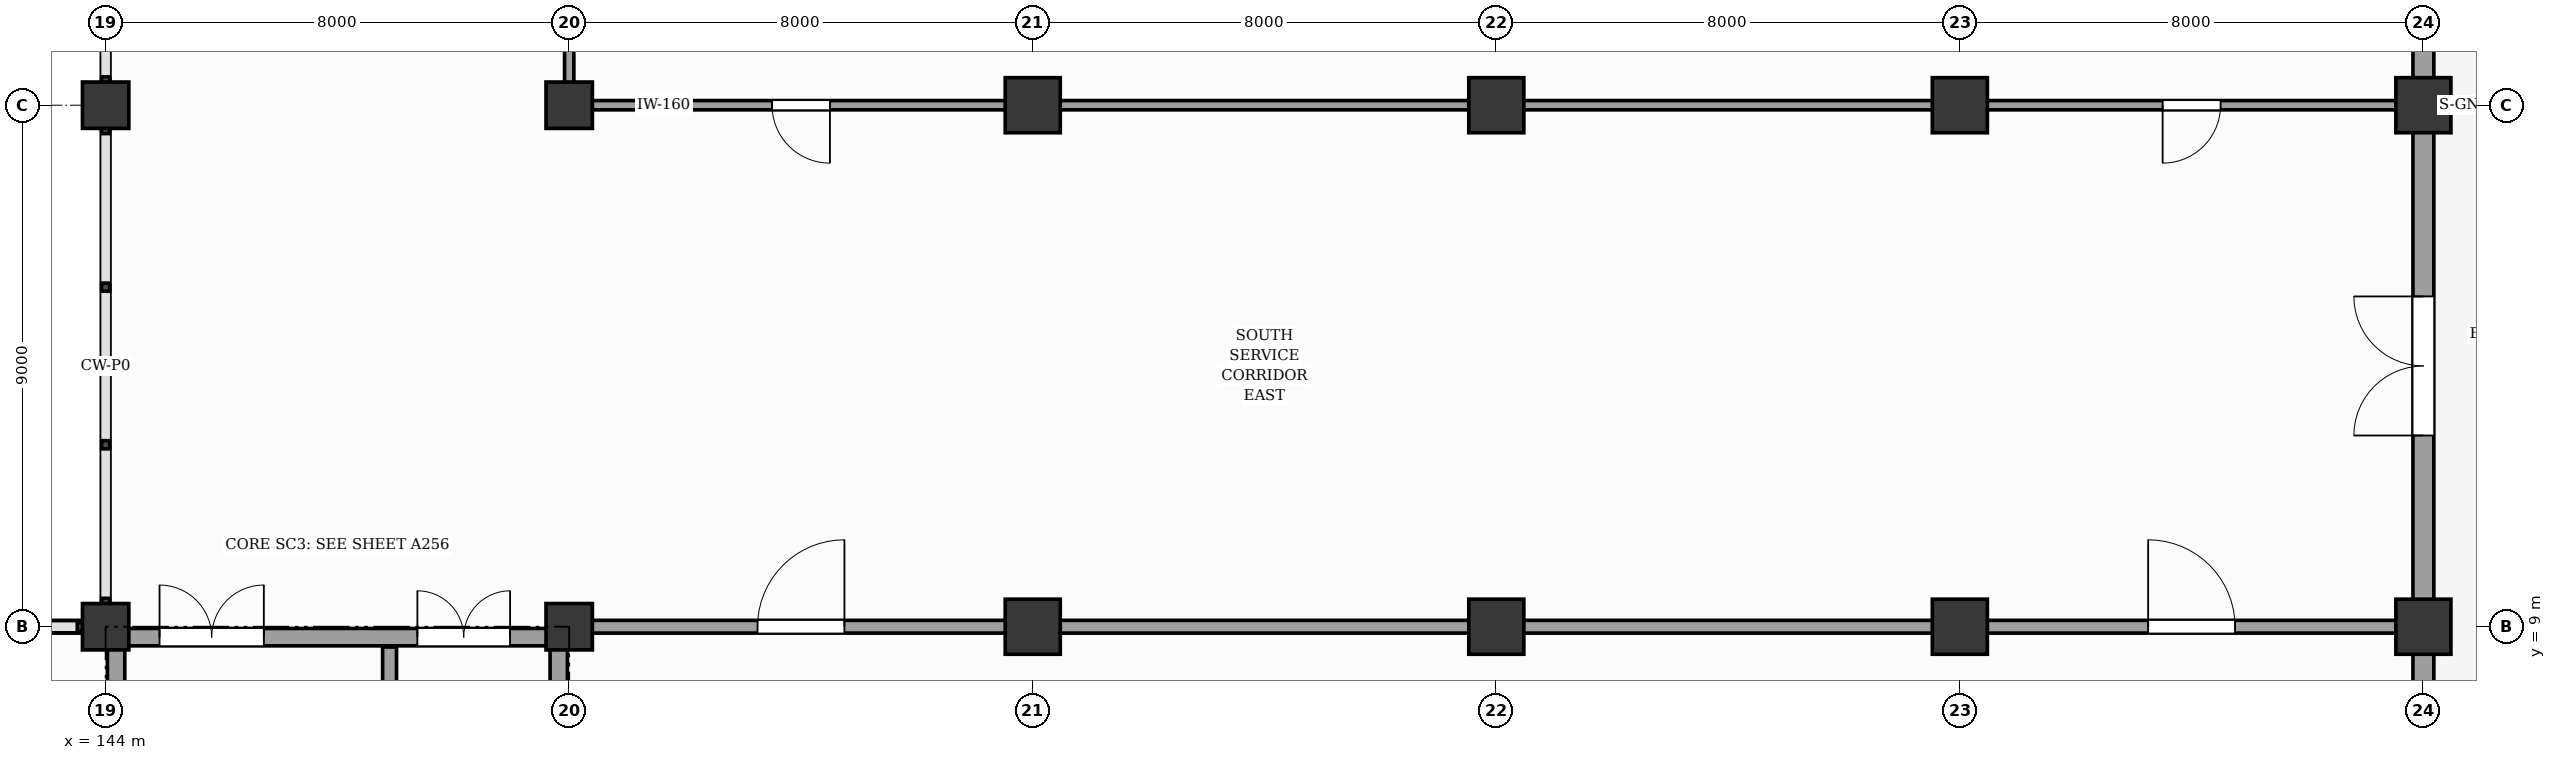
"""IFC4 building model, lengths in metres.
Left out: names, types, materials, properties, quantities, classifications, styles, units other than length and angle.
Written with IfcOpenShell. Run it as: python <this file> out.ifc"""

import sys

from ifc_helpers import new_model, si_unit, direction, frame, frame_2d, origin, origin_2d, place, context, subcontext, project, spatial, rectangle, extrude, element, fill, save


model = new_model("IFC4")
c1 = context("Model", 3, precision=1e-05, world=origin(), true_north=direction((0.0, 1.0)))
c2 = subcontext(c1, "Body", "Model", "MODEL_VIEW")
j1 = project(units=[si_unit("LENGTHUNIT", "METRE"), si_unit("PLANEANGLEUNIT", "RADIAN")], contexts=[c1])
p1 = place(None, origin())
s1 = spatial("IfcSite", under=j1, at=p1, CompositionType="ELEMENT")
p2 = place(p1, origin())
s2 = spatial("IfcBuilding", under=s1, at=p2, CompositionType="ELEMENT")
p3 = place(p2, origin())
s3 = spatial("IfcBuildingStorey", under=s2, at=p3, CompositionType="ELEMENT", Elevation=0.0)
for number, where, z_axis, x_axis in (
    (1, (144.0, 9.0, -0.3), (0.0, 0.0, 1.0), (1.0, 0.0, 0.0)),
    (2, (144.0, 18.0, -0.3), (0.0, 0.0, 1.0), (1.0, 0.0, 0.0)),
    (3, (152.0, 9.0, -0.3), (0.0, 0.0, 1.0), (1.0, 0.0, 0.0)),
    (4, (152.0, 18.0, -0.3), (0.0, 0.0, 1.0), (1.0, 0.0, 0.0)),
):
    element("IfcColumn", number, at=place(p3, frame(where, z_axis=z_axis, x_axis=x_axis)), inside=s3, PredefinedType="COLUMN", context=c2, shape_type="SweptSolid", body=[
        extrude(rectangle(XDim=0.8, YDim=0.8, at=origin_2d()), origin(), (0.0, 0.0, 1.0), 5.1),
    ])
for number, where, z_axis, x_axis in (
    (5, (160.0, 9.0, -0.3), (0.0, 0.0, 1.0), (1.0, 0.0, 0.0)),
    (6, (160.0, 18.0, -0.3), (0.0, 0.0, 1.0), (1.0, 0.0, 0.0)),
    (7, (168.0, 9.0, -0.3), (0.0, 0.0, 1.0), (1.0, 0.0, 0.0)),
    (8, (168.0, 18.0, -0.3), (0.0, 0.0, 1.0), (1.0, 0.0, 0.0)),
    (9, (176.0, 9.0, -0.3), (0.0, 0.0, 1.0), (1.0, 0.0, 0.0)),
    (10, (176.0, 18.0, -0.3), (0.0, 0.0, 1.0), (1.0, 0.0, 0.0)),
    (11, (184.0, 9.0, -0.3), (0.0, 0.0, 1.0), (1.0, 0.0, 0.0)),
    (12, (184.0, 18.0, -0.3), (0.0, 0.0, 1.0), (1.0, 0.0, 0.0)),
):
    element("IfcColumn", number, at=place(p3, frame(where, z_axis=z_axis, x_axis=x_axis)), inside=s3, PredefinedType="COLUMN", context=c2, shape_type="SweptSolid", body=[
        extrude(rectangle(XDim=0.95, YDim=0.95, at=origin_2d()), origin(), (0.0, 0.0, 1.0), 5.1),
    ])
p4 = place(p3, frame((184.0, 0.37, 0.0), z_axis=(0.0, 0.0, 1.0), x_axis=(0.0, 1.0, 0.0)))
e13 = element("IfcWall", 13, at=p4, inside=s3, PredefinedType="SOLIDWALL", context=c2, shape_type="SweptSolid", body=[
    extrude(rectangle(XDim=8.23, YDim=0.36, at=frame_2d((4.115, 0.0))), origin(), (0.0, 0.0, 1.0), 3.56),
])
p5 = place(p4, frame((3.03, 0.0, 0.0)))
e14 = element("IfcOpeningElement", 14, at=p5, cuts=e13, PredefinedType="OPENING", context=c2, shape_type="SweptSolid", body=[
    extrude(rectangle(XDim=2.2, YDim=2.3, at=frame_2d((1.1, 1.15))), frame((0.0, 0.19, 0.0), z_axis=(0.0, -1.0, 0.0), x_axis=(1.0, 0.0, 0.0)), (0.0, 0.0, 1.0), 0.38),
])
p6 = place(p3, frame((184.0, 9.4, 0.0), z_axis=(0.0, 0.0, 1.0), x_axis=(0.0, 1.0, 0.0)))
e15 = element("IfcWall", 15, at=p6, inside=s3, PredefinedType="SOLIDWALL", context=c2, shape_type="SweptSolid", body=[
    extrude(rectangle(XDim=8.2, YDim=0.36, at=frame_2d((4.1, 0.0))), origin(), (0.0, 0.0, 1.0), 3.41),
])
p7 = place(p6, frame((2.9, 0.0, 0.0)))
e16 = element("IfcOpeningElement", 16, at=p7, cuts=e15, PredefinedType="OPENING", context=c2, shape_type="SweptSolid", body=[
    extrude(rectangle(XDim=2.4, YDim=2.35, at=frame_2d((1.2, 1.175))), frame((0.0, 0.19, 0.0), z_axis=(0.0, -1.0, 0.0), x_axis=(1.0, 0.0, 0.0)), (0.0, 0.0, 1.0), 0.38),
])
p8 = place(p3, frame((184.0, 18.4, 0.0), z_axis=(0.0, 0.0, 1.0), x_axis=(0.0, 1.0, 0.0)))
e17 = element("IfcWall", 17, at=p8, inside=s3, PredefinedType="SOLIDWALL", context=c2, shape_type="SweptSolid", body=[
    extrude(rectangle(XDim=8.2, YDim=0.36, at=frame_2d((4.1, 0.0))), origin(), (0.0, 0.0, 1.0), 3.41),
])
p9 = place(p8, frame((2.9, 0.0, 0.0)))
e18 = element("IfcOpeningElement", 18, at=p9, cuts=e17, PredefinedType="OPENING", context=c2, shape_type="SweptSolid", body=[
    extrude(rectangle(XDim=2.4, YDim=2.35, at=frame_2d((1.2, 1.175))), frame((0.0, 0.19, 0.0), z_axis=(0.0, -1.0, 0.0), x_axis=(1.0, 0.0, 0.0)), (0.0, 0.0, 1.0), 0.38),
])
p10 = place(p3, frame((148.9, 0.35, 0.0), z_axis=(0.0, 0.0, 1.0), x_axis=(0.0, 1.0, 0.0)))
e19 = element("IfcWall", 19, at=p10, inside=s3, PredefinedType="SHEAR", context=c2, shape_type="SweptSolid", body=[
    extrude(rectangle(XDim=8.3, YDim=0.24, at=frame_2d((4.15, 0.0))), origin(), (0.0, 0.0, 1.0), 4.52),
])
p11 = place(p10, frame((6.45, 0.0, 0.0)))
e20 = element("IfcOpeningElement", 20, at=p11, cuts=e19, PredefinedType="OPENING", context=c2, shape_type="SweptSolid", body=[
    extrude(rectangle(XDim=1.2, YDim=2.15, at=frame_2d((0.6, 1.075))), frame((0.0, 0.13, 0.0), z_axis=(0.0, -1.0, 0.0), x_axis=(1.0, 0.0, 0.0)), (0.0, 0.0, 1.0), 0.26),
])
for number, where, z_axis, x_axis in (
    (21, (144.18, 0.18, 0.0), (0.0, 0.0, 1.0), (0.0, 1.0, 0.0)),
    (22, (151.82, 0.18, 0.0), (0.0, 0.0, 1.0), (0.0, 1.0, 0.0)),
):
    element("IfcWall", number, at=place(p3, frame(where, z_axis=z_axis, x_axis=x_axis)), inside=s3, PredefinedType="SHEAR", context=c2, shape_type="SweptSolid", body=[
        extrude(rectangle(XDim=8.64, YDim=0.3, at=frame_2d((4.32, 0.0))), origin(), (0.0, 0.0, 1.0), 4.52),
    ])
p12 = place(p3, frame((144.03, 8.82, 0.0), z_axis=(0.0, 0.0, 1.0), x_axis=(1.0, 0.0, 0.0)))
e23 = element("IfcWall", 23, at=p12, inside=s3, PredefinedType="SHEAR", context=c2, shape_type="SweptSolid", body=[
    extrude(rectangle(XDim=7.94, YDim=0.3, at=frame_2d((3.97, 0.0))), origin(), (0.0, 0.0, 1.0), 4.52),
])
p13 = place(p12, frame((5.35, 0.0, 0.0)))
e24 = element("IfcOpeningElement", 24, at=p13, cuts=e23, PredefinedType="OPENING", context=c2, shape_type="SweptSolid", body=[
    extrude(rectangle(XDim=1.6, YDim=2.15, at=frame_2d((0.8, 1.075))), frame((0.0, 0.16, 0.0), z_axis=(0.0, -1.0, 0.0), x_axis=(1.0, 0.0, 0.0)), (0.0, 0.0, 1.0), 0.32),
])
p14 = place(p12, frame((0.9, 0.0, 0.0)))
e25 = element("IfcOpeningElement", 25, at=p14, cuts=e23, PredefinedType="OPENING", context=c2, shape_type="SweptSolid", body=[
    extrude(rectangle(XDim=1.8, YDim=2.2, at=frame_2d((0.9, 1.1))), frame((0.0, 0.16, 0.0), z_axis=(0.0, -1.0, 0.0), x_axis=(1.0, 0.0, 0.0)), (0.0, 0.0, 1.0), 0.32),
])
p15 = place(p3, frame((136.3, 9.0, 0.0), z_axis=(0.0, 0.0, 1.0), x_axis=(1.0, 0.0, 0.0)))
e26 = element("IfcWall", 26, at=p15, inside=s3, PredefinedType="SOLIDWALL", context=c2, shape_type="SweptSolid", body=[
    extrude(rectangle(XDim=7.4, YDim=0.22, at=frame_2d((3.7, 0.0))), origin(), (0.0, 0.0, 1.0), 3.56),
])
p16 = place(p15, frame((2.95, 0.0, 0.0)))
e27 = element("IfcOpeningElement", 27, at=p16, cuts=e26, PredefinedType="OPENING", context=c2, shape_type="SweptSolid", body=[
    extrude(rectangle(XDim=1.5, YDim=2.2, at=frame_2d((0.75, 1.1))), frame((0.0, 0.12, 0.0), z_axis=(0.0, -1.0, 0.0), x_axis=(1.0, 0.0, 0.0)), (0.0, 0.0, 1.0), 0.24),
])
p17 = place(p3, frame((152.3, 18.0, 0.0), z_axis=(0.0, 0.0, 1.0), x_axis=(1.0, 0.0, 0.0)))
e28 = element("IfcWall", 28, at=p17, inside=s3, PredefinedType="PARTITIONING", context=c2, shape_type="SweptSolid", body=[
    extrude(rectangle(XDim=7.4, YDim=0.16, at=frame_2d((3.7, 0.0))), origin(), (0.0, 0.0, 1.0), 3.41),
])
p18 = place(p17, frame((3.2, 0.0, 0.0)))
e29 = element("IfcOpeningElement", 29, at=p18, cuts=e28, PredefinedType="OPENING", context=c2, shape_type="SweptSolid", body=[
    extrude(rectangle(XDim=1.0, YDim=2.1, at=frame_2d((0.5, 1.05))), frame((0.0, 0.09, 0.0), z_axis=(0.0, -1.0, 0.0), x_axis=(1.0, 0.0, 0.0)), (0.0, 0.0, 1.0), 0.18),
])
for number, where, z_axis, x_axis in (
    (30, (160.3, 18.0, 0.0), (0.0, 0.0, 1.0), (1.0, 0.0, 0.0)),
    (31, (168.3, 18.0, 0.0), (0.0, 0.0, 1.0), (1.0, 0.0, 0.0)),
):
    element("IfcWall", number, at=place(p3, frame(where, z_axis=z_axis, x_axis=x_axis)), inside=s3, PredefinedType="PARTITIONING", context=c2, shape_type="SweptSolid", body=[
        extrude(rectangle(XDim=7.4, YDim=0.16, at=frame_2d((3.7, 0.0))), origin(), (0.0, 0.0, 1.0), 3.41),
    ])
p19 = place(p3, frame((176.3, 18.0, 0.0), z_axis=(0.0, 0.0, 1.0), x_axis=(1.0, 0.0, 0.0)))
e32 = element("IfcWall", 32, at=p19, inside=s3, PredefinedType="PARTITIONING", context=c2, shape_type="SweptSolid", body=[
    extrude(rectangle(XDim=7.4, YDim=0.16, at=frame_2d((3.7, 0.0))), origin(), (0.0, 0.0, 1.0), 3.41),
])
p20 = place(p19, frame((3.2, 0.0, 0.0)))
e33 = element("IfcOpeningElement", 33, at=p20, cuts=e32, PredefinedType="OPENING", context=c2, shape_type="SweptSolid", body=[
    extrude(rectangle(XDim=1.0, YDim=2.1, at=frame_2d((0.5, 1.05))), frame((0.0, 0.09, 0.0), z_axis=(0.0, -1.0, 0.0), x_axis=(1.0, 0.0, 0.0)), (0.0, 0.0, 1.0), 0.18),
])
p21 = place(p3, frame((152.0, 18.3, 0.0), z_axis=(0.0, 0.0, 1.0), x_axis=(0.0, 1.0, 0.0)))
e34 = element("IfcWall", 34, at=p21, inside=s3, PredefinedType="PARTITIONING", context=c2, shape_type="SweptSolid", body=[
    extrude(rectangle(XDim=8.4, YDim=0.16, at=frame_2d((4.2, 0.0))), origin(), (0.0, 0.0, 1.0), 3.41),
])
p22 = place(p3, frame((152.3, 9.0, 0.0), z_axis=(0.0, 0.0, 1.0), x_axis=(1.0, 0.0, 0.0)))
e35 = element("IfcWall", 35, at=p22, inside=s3, PredefinedType="SOLIDWALL", context=c2, shape_type="SweptSolid", body=[
    extrude(rectangle(XDim=7.4, YDim=0.22, at=frame_2d((3.7, 0.0))), origin(), (0.0, 0.0, 1.0), 3.56),
])
p23 = place(p22, frame((2.95, 0.0, 0.0)))
e36 = element("IfcOpeningElement", 36, at=p23, cuts=e35, PredefinedType="OPENING", context=c2, shape_type="SweptSolid", body=[
    extrude(rectangle(XDim=1.5, YDim=2.2, at=frame_2d((0.75, 1.1))), frame((0.0, 0.12, 0.0), z_axis=(0.0, -1.0, 0.0), x_axis=(1.0, 0.0, 0.0)), (0.0, 0.0, 1.0), 0.24),
])
for number, where, z_axis, x_axis in (
    (37, (160.3, 9.0, 0.0), (0.0, 0.0, 1.0), (1.0, 0.0, 0.0)),
    (38, (168.3, 9.0, 0.0), (0.0, 0.0, 1.0), (1.0, 0.0, 0.0)),
):
    element("IfcWall", number, at=place(p3, frame(where, z_axis=z_axis, x_axis=x_axis)), inside=s3, PredefinedType="SOLIDWALL", context=c2, shape_type="SweptSolid", body=[
        extrude(rectangle(XDim=7.4, YDim=0.22, at=frame_2d((3.7, 0.0))), origin(), (0.0, 0.0, 1.0), 3.56),
    ])
p24 = place(p3, frame((176.3, 9.0, 0.0), z_axis=(0.0, 0.0, 1.0), x_axis=(1.0, 0.0, 0.0)))
e39 = element("IfcWall", 39, at=p24, inside=s3, PredefinedType="SOLIDWALL", context=c2, shape_type="SweptSolid", body=[
    extrude(rectangle(XDim=7.4, YDim=0.22, at=frame_2d((3.7, 0.0))), origin(), (0.0, 0.0, 1.0), 3.56),
])
p25 = place(p24, frame((2.95, 0.0, 0.0)))
e40 = element("IfcOpeningElement", 40, at=p25, cuts=e39, PredefinedType="OPENING", context=c2, shape_type="SweptSolid", body=[
    extrude(rectangle(XDim=1.5, YDim=2.2, at=frame_2d((0.75, 1.1))), frame((0.0, 0.12, 0.0), z_axis=(0.0, -1.0, 0.0), x_axis=(1.0, 0.0, 0.0)), (0.0, 0.0, 1.0), 0.24),
])
p26 = place(p7, origin())
e41 = element("IfcDoor", 41, at=p26, inside=s3, OperationType="DOUBLE_DOOR_SINGLE_SWING", PredefinedType="DOOR", context=c2, shape_type="SweptSolid", body=[
    extrude(rectangle(XDim=2.4, YDim=2.35, at=frame_2d((1.2, 1.175))), frame((0.0, 0.025, 0.0), z_axis=(0.0, -1.0, 0.0), x_axis=(1.0, 0.0, 0.0)), (0.0, 0.0, 1.0), 0.05),
])
fill(e16, e41)
p27 = place(p13, origin())
e42 = element("IfcDoor", 42, at=p27, inside=s3, OperationType="DOUBLE_DOOR_SINGLE_SWING", PredefinedType="DOOR", context=c2, shape_type="SweptSolid", body=[
    extrude(rectangle(XDim=1.6, YDim=2.15, at=frame_2d((0.8, 1.075))), frame((0.0, 0.025, 0.0), z_axis=(0.0, -1.0, 0.0), x_axis=(1.0, 0.0, 0.0)), (0.0, 0.0, 1.0), 0.05),
])
fill(e24, e42)
p28 = place(p14, origin())
e43 = element("IfcDoor", 43, at=p28, inside=s3, OperationType="DOUBLE_DOOR_SINGLE_SWING", PredefinedType="DOOR", context=c2, shape_type="SweptSolid", body=[
    extrude(rectangle(XDim=1.8, YDim=2.2, at=frame_2d((0.9, 1.1))), frame((0.0, 0.025, 0.0), z_axis=(0.0, -1.0, 0.0), x_axis=(1.0, 0.0, 0.0)), (0.0, 0.0, 1.0), 0.05),
])
fill(e25, e43)
p29 = place(p18, frame((1.0, 0.0, 0.0), z_axis=(0.0, 0.0, 1.0), x_axis=(-1.0, 0.0, 0.0)))
e44 = element("IfcDoor", 44, at=p29, inside=s3, OperationType="SINGLE_SWING_RIGHT", PredefinedType="DOOR", context=c2, shape_type="SweptSolid", body=[
    extrude(rectangle(XDim=1.0, YDim=2.1, at=frame_2d((0.5, 1.05))), frame((0.0, 0.025, 0.0), z_axis=(0.0, -1.0, 0.0), x_axis=(1.0, 0.0, 0.0)), (0.0, 0.0, 1.0), 0.05),
])
fill(e29, e44)
p30 = place(p20, frame((1.0, 0.0, 0.0), z_axis=(0.0, 0.0, 1.0), x_axis=(-1.0, 0.0, 0.0)))
e45 = element("IfcDoor", 45, at=p30, inside=s3, OperationType="SINGLE_SWING_LEFT", PredefinedType="DOOR", context=c2, shape_type="SweptSolid", body=[
    extrude(rectangle(XDim=1.0, YDim=2.1, at=frame_2d((0.5, 1.05))), frame((0.0, 0.025, 0.0), z_axis=(0.0, -1.0, 0.0), x_axis=(1.0, 0.0, 0.0)), (0.0, 0.0, 1.0), 0.05),
])
fill(e33, e45)
p31 = place(p23, origin())
e46 = element("IfcDoor", 46, at=p31, inside=s3, OperationType="SINGLE_SWING_RIGHT", PredefinedType="DOOR", context=c2, shape_type="SweptSolid", body=[
    extrude(rectangle(XDim=1.5, YDim=2.2, at=frame_2d((0.75, 1.1))), frame((0.0, 0.025, 0.0), z_axis=(0.0, -1.0, 0.0), x_axis=(1.0, 0.0, 0.0)), (0.0, 0.0, 1.0), 0.05),
])
fill(e36, e46)
p32 = place(p25, origin())
e47 = element("IfcDoor", 47, at=p32, inside=s3, OperationType="SINGLE_SWING_LEFT", PredefinedType="DOOR", context=c2, shape_type="SweptSolid", body=[
    extrude(rectangle(XDim=1.5, YDim=2.2, at=frame_2d((0.75, 1.1))), frame((0.0, 0.025, 0.0), z_axis=(0.0, -1.0, 0.0), x_axis=(1.0, 0.0, 0.0)), (0.0, 0.0, 1.0), 0.05),
])
fill(e40, e47)
save(model, sys.argv[1])
